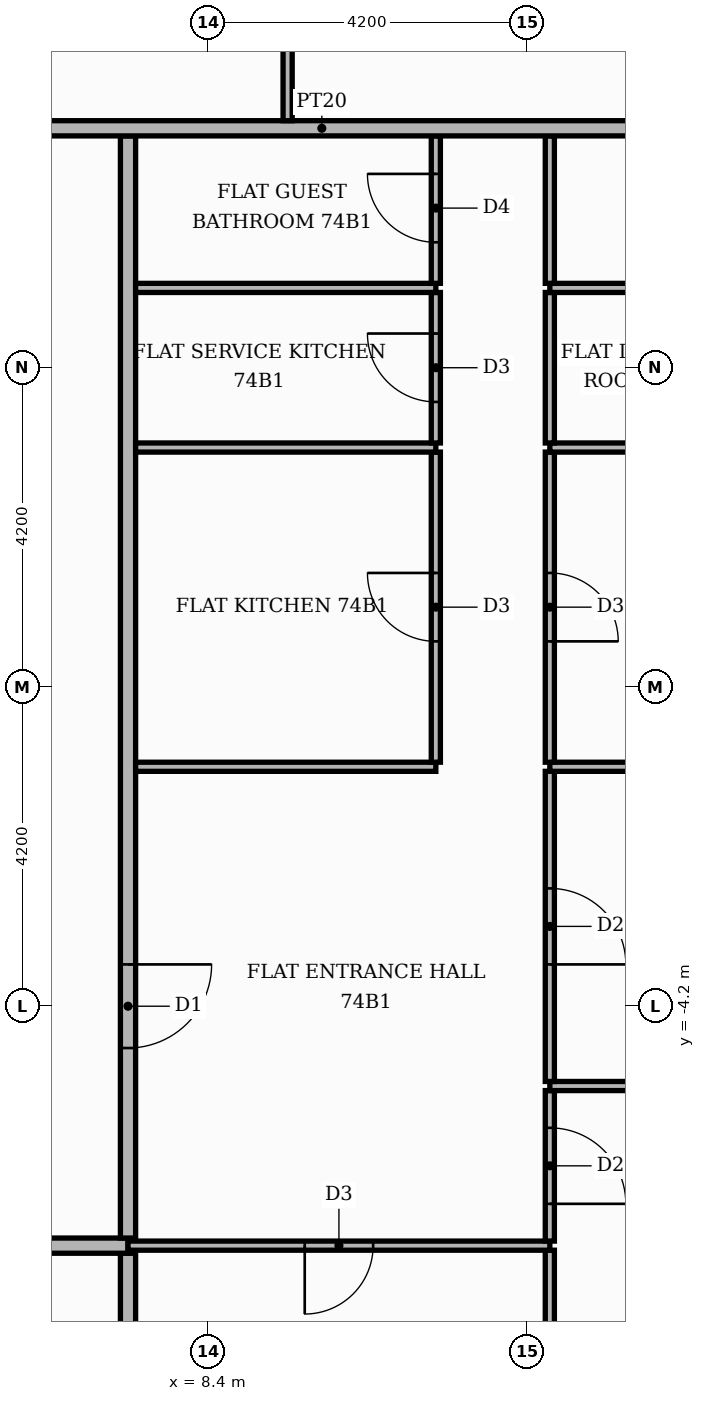
"""IFC4 building model, lengths in metres.
Left out: names, types, materials, properties, quantities, classifications, styles, units other than length and angle.
Written with IfcOpenShell. Run it as: python <this file> out.ifc"""

import sys

from ifc_helpers import new_model, si_unit, direction, frame, frame_2d, origin, place, context, subcontext, project, spatial, rectangle, extrude, element, fill, save


model = new_model("IFC4")
c1 = context("Model", 3, precision=1e-05, world=origin(), true_north=direction((0.0, 1.0)))
c2 = subcontext(c1, "Body", "Model", "MODEL_VIEW")
j1 = project(units=[si_unit("LENGTHUNIT", "METRE"), si_unit("PLANEANGLEUNIT", "RADIAN")], contexts=[c1])
p1 = place(None, origin())
s1 = spatial("IfcSite", under=j1, at=p1, CompositionType="ELEMENT")
p2 = place(p1, origin())
s2 = spatial("IfcBuilding", under=s1, at=p2, CompositionType="ELEMENT")
p3 = place(p2, frame((0.0, 0.0, 308.4)))
s3 = spatial("IfcBuildingStorey", under=s2, at=p3, CompositionType="ELEMENT", Elevation=308.4)
p4 = place(p3, frame((7.35, -18.5, 0.0), z_axis=(0.0, 0.0, 1.0), x_axis=(0.0, 1.0, 0.0)))
e1 = element("IfcWall", 1, at=p4, inside=s3, PredefinedType="PARTITIONING", context=c2, shape_type="SweptSolid", body=[
    extrude(rectangle(XDim=11.05, YDim=0.2, at=frame_2d((5.525, 0.0))), origin(), (0.0, 0.0, 1.0), 3.55),
])
p5 = place(p3, frame((12.9, -12.1, 0.0), z_axis=(0.0, 0.0, 1.0), x_axis=(0.0, 1.0, 0.0)))
e2 = element("IfcWall", 2, at=p5, inside=s3, PredefinedType="PARTITIONING", context=c2, shape_type="SweptSolid", body=[
    extrude(rectangle(XDim=4.69, YDim=0.12, at=frame_2d((2.345, 0.0))), origin(), (0.0, 0.0, 1.0), 3.55),
])
p6 = place(p3, frame((-18.5, -7.35, 0.0), z_axis=(0.0, 0.0, 1.0), x_axis=(1.0, 0.0, 0.0)))
e3 = element("IfcWall", 3, at=p6, inside=s3, PredefinedType="PARTITIONING", context=c2, shape_type="SweptSolid", body=[
    extrude(rectangle(XDim=25.85, YDim=0.2, at=frame_2d((12.925, 0.0))), origin(), (0.0, 0.0, 1.0), 3.55),
])
p7 = place(p6, frame((13.75, 0.0, 0.0)))
e4 = element("IfcOpeningElement", 4, at=p7, cuts=e3, PredefinedType="OPENING", context=c2, shape_type="SweptSolid", body=[
    extrude(rectangle(XDim=1.1, YDim=2.4, at=frame_2d((0.55, 1.2))), frame((0.0, 0.11, 0.0), z_axis=(0.0, -1.0, 0.0), x_axis=(1.0, 0.0, 0.0)), (0.0, 0.0, 1.0), 0.22),
])
p8 = place(p3, frame((7.35, -7.35, 0.0), z_axis=(0.0, 0.0, 1.0), x_axis=(1.0, 0.0, 0.0)))
e5 = element("IfcWall", 5, at=p8, inside=s3, PredefinedType="PARTITIONING", context=c2, shape_type="SweptSolid", body=[
    extrude(rectangle(XDim=5.55, YDim=0.12, at=frame_2d((2.775, 0.0))), origin(), (0.0, 0.0, 1.0), 3.55),
])
p9 = place(p8, frame((2.325, 0.0, 0.0)))
e6 = element("IfcOpeningElement", 6, at=p9, cuts=e5, PredefinedType="OPENING", context=c2, shape_type="SweptSolid", body=[
    extrude(rectangle(XDim=0.9, YDim=2.1, at=frame_2d((0.45, 1.05))), frame((0.0, 0.07, 0.0), z_axis=(0.0, -1.0, 0.0), x_axis=(1.0, 0.0, 0.0)), (0.0, 0.0, 1.0), 0.14),
])
p10 = place(p3, frame((12.9, -7.29, 0.0), z_axis=(0.0, 0.0, 1.0), x_axis=(0.0, 1.0, 0.0)))
e7 = element("IfcWall", 7, at=p10, inside=s3, PredefinedType="PARTITIONING", context=c2, shape_type="SweptSolid", body=[
    extrude(rectangle(XDim=1.98, YDim=0.12, at=frame_2d((0.99, 0.0))), origin(), (0.0, 0.0, 1.0), 3.55),
])
p11 = place(p10, frame((0.49, 0.0, 0.0)))
e8 = element("IfcOpeningElement", 8, at=p11, cuts=e7, PredefinedType="OPENING", context=c2, shape_type="SweptSolid", body=[
    extrude(rectangle(XDim=1.0, YDim=2.1, at=frame_2d((0.5, 1.05))), frame((0.0, 0.07, 0.0), z_axis=(0.0, -1.0, 0.0), x_axis=(1.0, 0.0, 0.0)), (0.0, 0.0, 1.0), 0.14),
])
p12 = place(p3, frame((7.35, -7.25, 0.0), z_axis=(0.0, 0.0, 1.0), x_axis=(0.0, 1.0, 0.0)))
e9 = element("IfcWall", 9, at=p12, inside=s3, PredefinedType="PARTITIONING", context=c2, shape_type="SweptSolid", body=[
    extrude(rectangle(XDim=14.5, YDim=0.2, at=frame_2d((7.25, 0.0))), origin(), (0.0, 0.0, 1.0), 3.55),
])
p13 = place(p12, frame((2.5, 0.0, 0.0)))
e10 = element("IfcOpeningElement", 10, at=p13, cuts=e9, PredefinedType="OPENING", context=c2, shape_type="SweptSolid", body=[
    extrude(rectangle(XDim=1.1, YDim=2.4, at=frame_2d((0.55, 1.2))), frame((0.0, 0.11, 0.0), z_axis=(0.0, -1.0, 0.0), x_axis=(1.0, 0.0, 0.0)), (0.0, 0.0, 1.0), 0.22),
])
p14 = place(p3, frame((12.9, -5.25, 0.0), z_axis=(0.0, 0.0, 1.0), x_axis=(1.0, 0.0, 0.0)))
e11 = element("IfcWall", 11, at=p14, inside=s3, PredefinedType="PARTITIONING", context=c2, shape_type="SweptSolid", body=[
    extrude(rectangle(XDim=5.6, YDim=0.12, at=frame_2d((2.8, 0.0))), origin(), (0.0, 0.0, 1.0), 3.55),
])
p15 = place(p3, frame((12.9, -5.19, 0.0), z_axis=(0.0, 0.0, 1.0), x_axis=(0.0, 1.0, 0.0)))
e12 = element("IfcWall", 12, at=p15, inside=s3, PredefinedType="PARTITIONING", context=c2, shape_type="SweptSolid", body=[
    extrude(rectangle(XDim=4.08, YDim=0.12, at=frame_2d((2.04, 0.0))), origin(), (0.0, 0.0, 1.0), 3.55),
])
p16 = place(p15, frame((1.54, 0.0, 0.0)))
e13 = element("IfcOpeningElement", 13, at=p16, cuts=e12, PredefinedType="OPENING", context=c2, shape_type="SweptSolid", body=[
    extrude(rectangle(XDim=1.0, YDim=2.1, at=frame_2d((0.5, 1.05))), frame((0.0, 0.07, 0.0), z_axis=(0.0, -1.0, 0.0), x_axis=(1.0, 0.0, 0.0)), (0.0, 0.0, 1.0), 0.14),
])
p17 = place(p3, frame((7.45, -1.05, 0.0), z_axis=(0.0, 0.0, 1.0), x_axis=(1.0, 0.0, 0.0)))
e14 = element("IfcWall", 14, at=p17, inside=s3, PredefinedType="PARTITIONING", context=c2, shape_type="SweptSolid", body=[
    extrude(rectangle(XDim=3.95, YDim=0.12, at=frame_2d((1.975, 0.0))), origin(), (0.0, 0.0, 1.0), 3.55),
])
p18 = place(p3, frame((12.9, -1.05, 0.0), z_axis=(0.0, 0.0, 1.0), x_axis=(1.0, 0.0, 0.0)))
e15 = element("IfcWall", 15, at=p18, inside=s3, PredefinedType="PARTITIONING", context=c2, shape_type="SweptSolid", body=[
    extrude(rectangle(XDim=4.049, YDim=0.12, at=frame_2d((2.024, 0.0))), origin(), (0.0, 0.0, 1.0), 3.55),
])
p19 = place(p3, frame((11.4, -0.99, 0.0), z_axis=(0.0, 0.0, 1.0), x_axis=(0.0, 1.0, 0.0)))
e16 = element("IfcWall", 16, at=p19, inside=s3, PredefinedType="PARTITIONING", context=c2, shape_type="SweptSolid", body=[
    extrude(rectangle(XDim=4.08, YDim=0.12, at=frame_2d((2.04, 0.0))), origin(), (0.0, 0.0, 1.0), 3.55),
])
p20 = place(p19, frame((1.59, 0.0, 0.0)))
e17 = element("IfcOpeningElement", 17, at=p20, cuts=e16, PredefinedType="OPENING", context=c2, shape_type="SweptSolid", body=[
    extrude(rectangle(XDim=0.9, YDim=2.1, at=frame_2d((0.45, 1.05))), frame((0.0, 0.07, 0.0), z_axis=(0.0, -1.0, 0.0), x_axis=(1.0, 0.0, 0.0)), (0.0, 0.0, 1.0), 0.14),
])
p21 = place(p3, frame((12.9, -0.99, 0.0), z_axis=(0.0, 0.0, 1.0), x_axis=(0.0, 1.0, 0.0)))
e18 = element("IfcWall", 18, at=p21, inside=s3, PredefinedType="PARTITIONING", context=c2, shape_type="SweptSolid", body=[
    extrude(rectangle(XDim=4.08, YDim=0.12, at=frame_2d((2.04, 0.0))), origin(), (0.0, 0.0, 1.0), 3.55),
])
p22 = place(p21, frame((1.59, 0.0, 0.0)))
e19 = element("IfcOpeningElement", 19, at=p22, cuts=e18, PredefinedType="OPENING", context=c2, shape_type="SweptSolid", body=[
    extrude(rectangle(XDim=0.9, YDim=2.1, at=frame_2d((0.45, 1.05))), frame((0.0, 0.07, 0.0), z_axis=(0.0, -1.0, 0.0), x_axis=(1.0, 0.0, 0.0)), (0.0, 0.0, 1.0), 0.14),
])
p23 = place(p3, frame((7.45, 3.15, 0.0), z_axis=(0.0, 0.0, 1.0), x_axis=(1.0, 0.0, 0.0)))
e20 = element("IfcWall", 20, at=p23, inside=s3, PredefinedType="PARTITIONING", context=c2, shape_type="SweptSolid", body=[
    extrude(rectangle(XDim=3.95, YDim=0.12, at=frame_2d((1.975, 0.0))), origin(), (0.0, 0.0, 1.0), 3.55),
])
p24 = place(p3, frame((12.9, 3.15, 0.0), z_axis=(0.0, 0.0, 1.0), x_axis=(1.0, 0.0, 0.0)))
e21 = element("IfcWall", 21, at=p24, inside=s3, PredefinedType="PARTITIONING", context=c2, shape_type="SweptSolid", body=[
    extrude(rectangle(XDim=5.6, YDim=0.12, at=frame_2d((2.8, 0.0))), origin(), (0.0, 0.0, 1.0), 3.55),
])
p25 = place(p24, frame((2.5, 0.0, 0.0)))
e22 = element("IfcOpeningElement", 22, at=p25, cuts=e21, PredefinedType="OPENING", context=c2, shape_type="SweptSolid", body=[
    extrude(rectangle(XDim=0.9, YDim=2.1, at=frame_2d((0.45, 1.05))), frame((0.0, 0.07, 0.0), z_axis=(0.0, -1.0, 0.0), x_axis=(1.0, 0.0, 0.0)), (0.0, 0.0, 1.0), 0.14),
])
p26 = place(p3, frame((11.4, 3.21, 0.0), z_axis=(0.0, 0.0, 1.0), x_axis=(0.0, 1.0, 0.0)))
e23 = element("IfcWall", 23, at=p26, inside=s3, PredefinedType="PARTITIONING", context=c2, shape_type="SweptSolid", body=[
    extrude(rectangle(XDim=1.98, YDim=0.12, at=frame_2d((0.99, 0.0))), origin(), (0.0, 0.0, 1.0), 3.55),
])
p27 = place(p26, frame((0.54, 0.0, 0.0)))
e24 = element("IfcOpeningElement", 24, at=p27, cuts=e23, PredefinedType="OPENING", context=c2, shape_type="SweptSolid", body=[
    extrude(rectangle(XDim=0.9, YDim=2.1, at=frame_2d((0.45, 1.05))), frame((0.0, 0.07, 0.0), z_axis=(0.0, -1.0, 0.0), x_axis=(1.0, 0.0, 0.0)), (0.0, 0.0, 1.0), 0.14),
])
p28 = place(p3, frame((12.9, 3.21, 0.0), z_axis=(0.0, 0.0, 1.0), x_axis=(0.0, 1.0, 0.0)))
e25 = element("IfcWall", 25, at=p28, inside=s3, PredefinedType="PARTITIONING", context=c2, shape_type="SweptSolid", body=[
    extrude(rectangle(XDim=1.98, YDim=0.12, at=frame_2d((0.99, 0.0))), origin(), (0.0, 0.0, 1.0), 3.55),
])
p29 = place(p3, frame((7.45, 5.25, 0.0), z_axis=(0.0, 0.0, 1.0), x_axis=(1.0, 0.0, 0.0)))
e26 = element("IfcWall", 26, at=p29, inside=s3, PredefinedType="PARTITIONING", context=c2, shape_type="SweptSolid", body=[
    extrude(rectangle(XDim=3.95, YDim=0.12, at=frame_2d((1.975, 0.0))), origin(), (0.0, 0.0, 1.0), 3.55),
])
p30 = place(p3, frame((12.9, 5.25, 0.0), z_axis=(0.0, 0.0, 1.0), x_axis=(1.0, 0.0, 0.0)))
e27 = element("IfcWall", 27, at=p30, inside=s3, PredefinedType="PARTITIONING", context=c2, shape_type="SweptSolid", body=[
    extrude(rectangle(XDim=5.6, YDim=0.12, at=frame_2d((2.8, 0.0))), origin(), (0.0, 0.0, 1.0), 3.55),
])
p31 = place(p30, frame((2.5, 0.0, 0.0)))
e28 = element("IfcOpeningElement", 28, at=p31, cuts=e27, PredefinedType="OPENING", context=c2, shape_type="SweptSolid", body=[
    extrude(rectangle(XDim=0.9, YDim=2.1, at=frame_2d((0.45, 1.05))), frame((0.0, 0.07, 0.0), z_axis=(0.0, -1.0, 0.0), x_axis=(1.0, 0.0, 0.0)), (0.0, 0.0, 1.0), 0.14),
])
p32 = place(p3, frame((11.4, 5.31, 0.0), z_axis=(0.0, 0.0, 1.0), x_axis=(0.0, 1.0, 0.0)))
e29 = element("IfcWall", 29, at=p32, inside=s3, PredefinedType="PARTITIONING", context=c2, shape_type="SweptSolid", body=[
    extrude(rectangle(XDim=1.94, YDim=0.12, at=frame_2d((0.97, 0.0))), origin(), (0.0, 0.0, 1.0), 3.55),
])
p33 = place(p32, frame((0.54, 0.0, 0.0)))
e30 = element("IfcOpeningElement", 30, at=p33, cuts=e29, PredefinedType="OPENING", context=c2, shape_type="SweptSolid", body=[
    extrude(rectangle(XDim=0.9, YDim=2.1, at=frame_2d((0.45, 1.05))), frame((0.0, 0.07, 0.0), z_axis=(0.0, -1.0, 0.0), x_axis=(1.0, 0.0, 0.0)), (0.0, 0.0, 1.0), 0.14),
])
p34 = place(p3, frame((12.9, 5.31, 0.0), z_axis=(0.0, 0.0, 1.0), x_axis=(0.0, 1.0, 0.0)))
e31 = element("IfcWall", 31, at=p34, inside=s3, PredefinedType="PARTITIONING", context=c2, shape_type="SweptSolid", body=[
    extrude(rectangle(XDim=1.94, YDim=0.12, at=frame_2d((0.97, 0.0))), origin(), (0.0, 0.0, 1.0), 3.55),
])
p35 = place(p3, frame((1.3, 7.35, 0.0), z_axis=(0.0, 0.0, 1.0), x_axis=(1.0, 0.0, 0.0)))
e32 = element("IfcWall", 32, at=p35, inside=s3, PredefinedType="PARTITIONING", context=c2, shape_type="SweptSolid", body=[
    extrude(rectangle(XDim=17.2, YDim=0.2, at=frame_2d((8.6, 0.0))), origin(), (0.0, 0.0, 1.0), 3.55),
])
p36 = place(p35, frame((3.4, 0.0, 0.0)))
e33 = element("IfcOpeningElement", 33, at=p36, cuts=e32, PredefinedType="OPENING", context=c2, shape_type="SweptSolid", body=[
    extrude(rectangle(XDim=1.1, YDim=2.4, at=frame_2d((0.55, 1.2))), frame((0.0, 0.11, 0.0), z_axis=(0.0, -1.0, 0.0), x_axis=(1.0, 0.0, 0.0)), (0.0, 0.0, 1.0), 0.22),
])
p37 = place(p3, frame((9.45, 7.45, 0.0), z_axis=(0.0, 0.0, 1.0), x_axis=(0.0, 1.0, 0.0)))
e34 = element("IfcWall", 34, at=p37, inside=s3, PredefinedType="PARTITIONING", context=c2, shape_type="SweptSolid", body=[
    extrude(rectangle(XDim=6.29, YDim=0.12, at=frame_2d((3.145, 0.0))), origin(), (0.0, 0.0, 1.0), 3.55),
])
p38 = place(p37, frame((2.675, 0.0, 0.0)))
e35 = element("IfcOpeningElement", 35, at=p38, cuts=e34, PredefinedType="OPENING", context=c2, shape_type="SweptSolid", body=[
    extrude(rectangle(XDim=0.9, YDim=2.1, at=frame_2d((0.45, 1.05))), frame((0.0, 0.07, 0.0), z_axis=(0.0, -1.0, 0.0), x_axis=(1.0, 0.0, 0.0)), (0.0, 0.0, 1.0), 0.14),
])
p39 = place(p13, frame((1.1, 0.0, 0.0), z_axis=(0.0, 0.0, 1.0), x_axis=(-1.0, 0.0, 0.0)))
e36 = element("IfcDoor", 36, at=p39, inside=s3, OperationType="SINGLE_SWING_RIGHT", PredefinedType="DOOR", context=c2, shape_type="SweptSolid", body=[
    extrude(rectangle(XDim=1.1, YDim=2.4, at=frame_2d((0.55, 1.2))), frame((0.0, 0.025, 0.0), z_axis=(0.0, -1.0, 0.0), x_axis=(1.0, 0.0, 0.0)), (0.0, 0.0, 1.0), 0.05),
])
fill(e10, e36)
p40 = place(p9, frame((0.9, 0.0, 0.0), z_axis=(0.0, 0.0, 1.0), x_axis=(-1.0, 0.0, 0.0)))
e37 = element("IfcDoor", 37, at=p40, inside=s3, OperationType="SINGLE_SWING_LEFT", PredefinedType="DOOR", context=c2, shape_type="SweptSolid", body=[
    extrude(rectangle(XDim=0.9, YDim=2.1, at=frame_2d((0.45, 1.05))), frame((0.0, 0.025, 0.0), z_axis=(0.0, -1.0, 0.0), x_axis=(1.0, 0.0, 0.0)), (0.0, 0.0, 1.0), 0.05),
])
fill(e6, e37)
p41 = place(p20, origin())
e38 = element("IfcDoor", 38, at=p41, inside=s3, OperationType="SINGLE_SWING_RIGHT", PredefinedType="DOOR", context=c2, shape_type="SweptSolid", body=[
    extrude(rectangle(XDim=0.9, YDim=2.1, at=frame_2d((0.45, 1.05))), frame((0.0, 0.025, 0.0), z_axis=(0.0, -1.0, 0.0), x_axis=(1.0, 0.0, 0.0)), (0.0, 0.0, 1.0), 0.05),
])
fill(e17, e38)
p42 = place(p27, origin())
e39 = element("IfcDoor", 39, at=p42, inside=s3, OperationType="SINGLE_SWING_RIGHT", PredefinedType="DOOR", context=c2, shape_type="SweptSolid", body=[
    extrude(rectangle(XDim=0.9, YDim=2.1, at=frame_2d((0.45, 1.05))), frame((0.0, 0.025, 0.0), z_axis=(0.0, -1.0, 0.0), x_axis=(1.0, 0.0, 0.0)), (0.0, 0.0, 1.0), 0.05),
])
fill(e24, e39)
p43 = place(p33, origin())
e40 = element("IfcDoor", 40, at=p43, inside=s3, OperationType="SINGLE_SWING_RIGHT", PredefinedType="DOOR", context=c2, shape_type="SweptSolid", body=[
    extrude(rectangle(XDim=0.9, YDim=2.1, at=frame_2d((0.45, 1.05))), frame((0.0, 0.025, 0.0), z_axis=(0.0, -1.0, 0.0), x_axis=(1.0, 0.0, 0.0)), (0.0, 0.0, 1.0), 0.05),
])
fill(e30, e40)
p44 = place(p11, frame((1.0, 0.0, 0.0), z_axis=(0.0, 0.0, 1.0), x_axis=(-1.0, 0.0, 0.0)))
e41 = element("IfcDoor", 41, at=p44, inside=s3, OperationType="SINGLE_SWING_LEFT", PredefinedType="DOOR", context=c2, shape_type="SweptSolid", body=[
    extrude(rectangle(XDim=1.0, YDim=2.1, at=frame_2d((0.5, 1.05))), frame((0.0, 0.025, 0.0), z_axis=(0.0, -1.0, 0.0), x_axis=(1.0, 0.0, 0.0)), (0.0, 0.0, 1.0), 0.05),
])
fill(e8, e41)
p45 = place(p16, frame((1.0, 0.0, 0.0), z_axis=(0.0, 0.0, 1.0), x_axis=(-1.0, 0.0, 0.0)))
e42 = element("IfcDoor", 42, at=p45, inside=s3, OperationType="SINGLE_SWING_LEFT", PredefinedType="DOOR", context=c2, shape_type="SweptSolid", body=[
    extrude(rectangle(XDim=1.0, YDim=2.1, at=frame_2d((0.5, 1.05))), frame((0.0, 0.025, 0.0), z_axis=(0.0, -1.0, 0.0), x_axis=(1.0, 0.0, 0.0)), (0.0, 0.0, 1.0), 0.05),
])
fill(e13, e42)
p46 = place(p22, frame((0.9, 0.0, 0.0), z_axis=(0.0, 0.0, 1.0), x_axis=(-1.0, 0.0, 0.0)))
e43 = element("IfcDoor", 43, at=p46, inside=s3, OperationType="SINGLE_SWING_LEFT", PredefinedType="DOOR", context=c2, shape_type="SweptSolid", body=[
    extrude(rectangle(XDim=0.9, YDim=2.1, at=frame_2d((0.45, 1.05))), frame((0.0, 0.025, 0.0), z_axis=(0.0, -1.0, 0.0), x_axis=(1.0, 0.0, 0.0)), (0.0, 0.0, 1.0), 0.05),
])
fill(e19, e43)
save(model, sys.argv[1])
